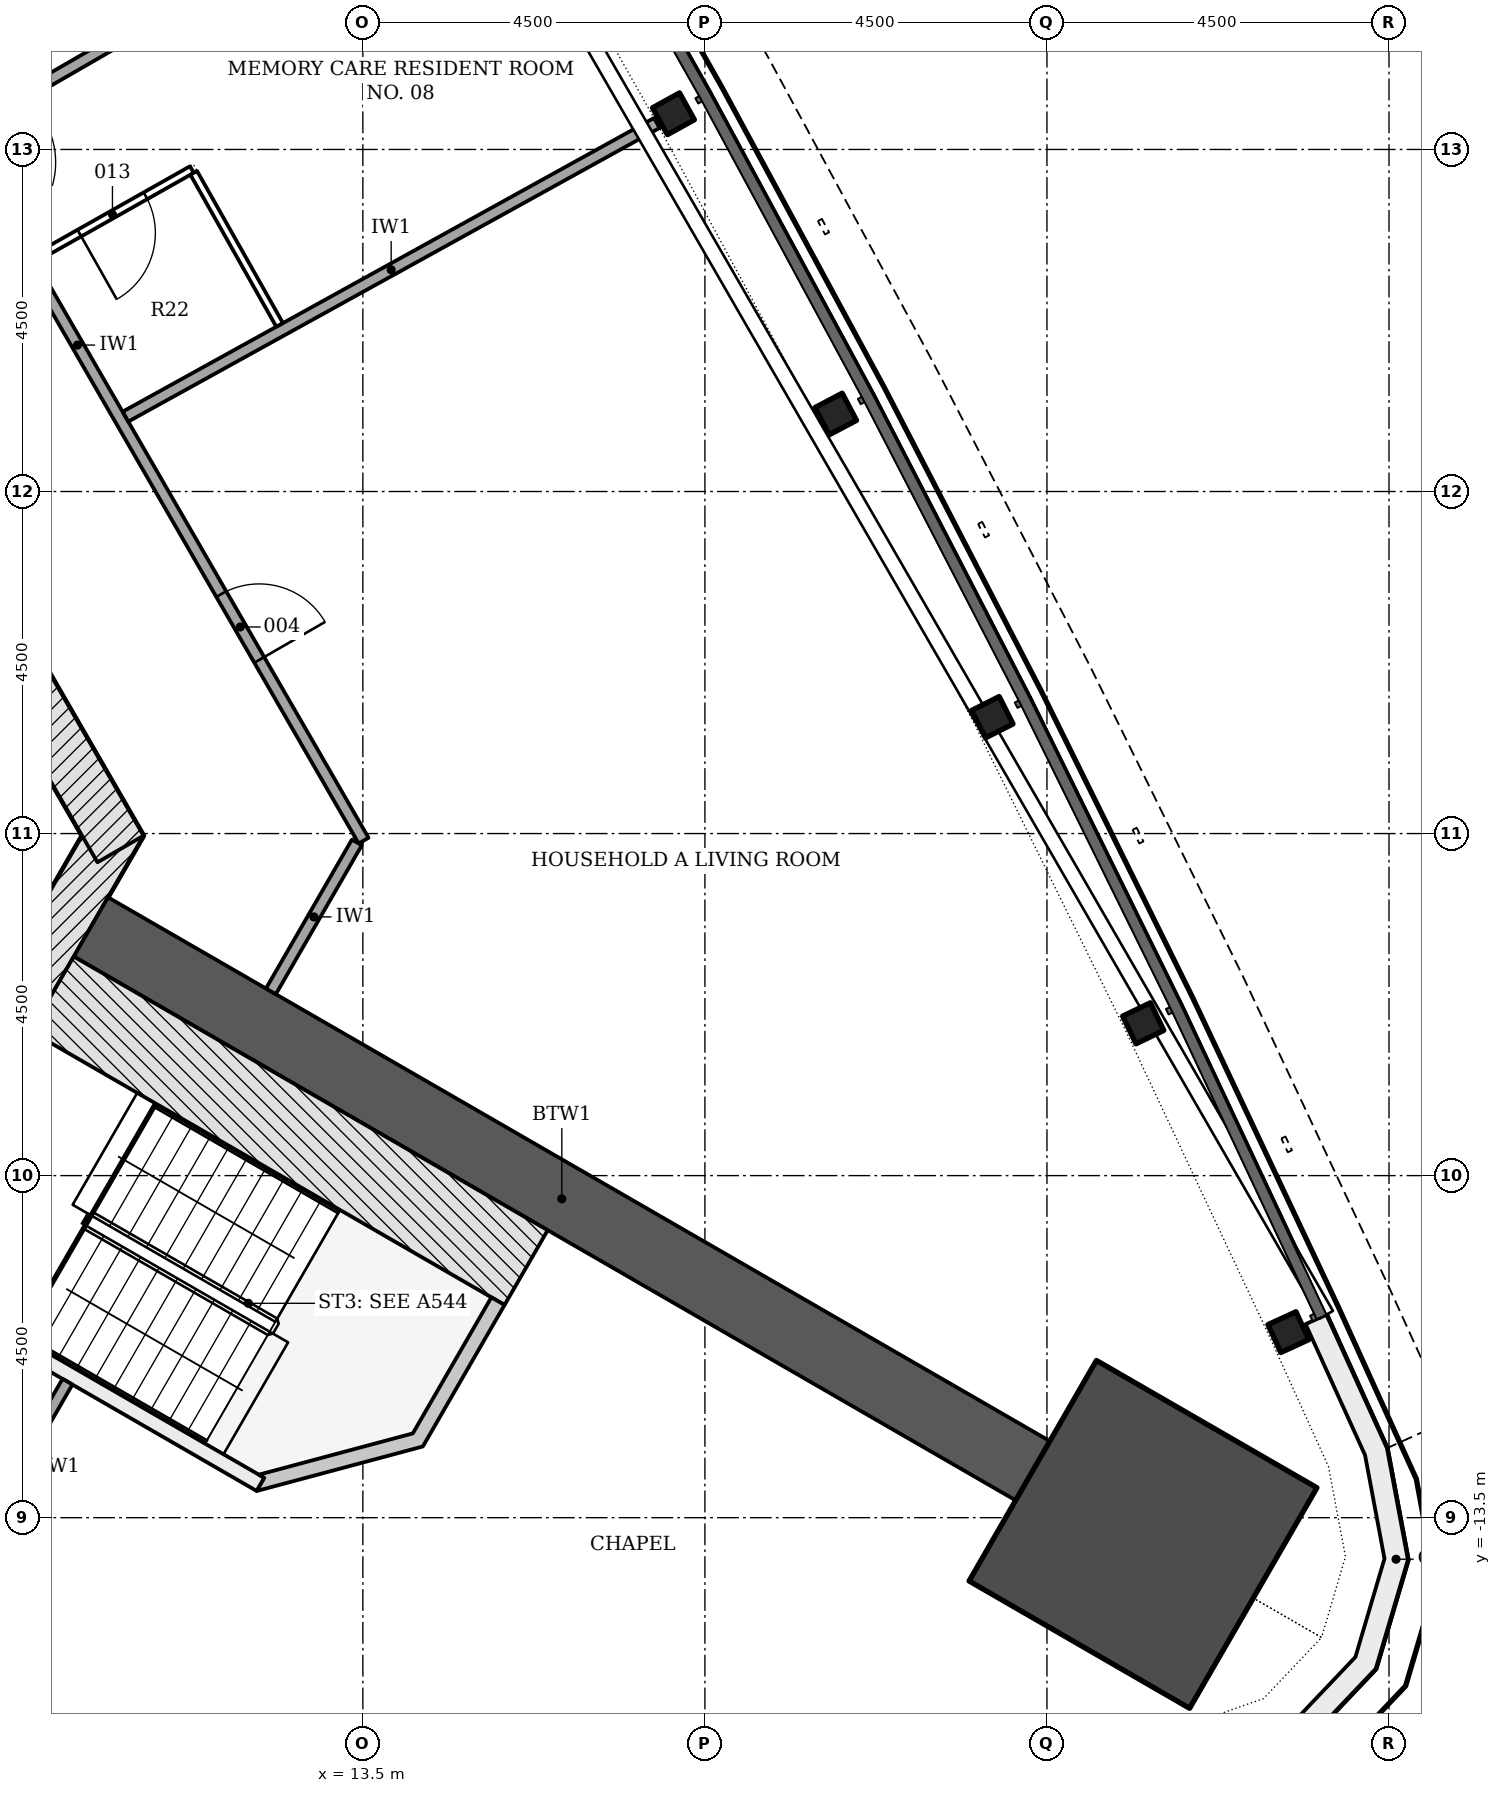
"""IFC4 building model, lengths in metres.
Left out: names, types, materials, properties, quantities, classifications, styles, units other than length and angle.
Written with IfcOpenShell. Run it as: python <this file> out.ifc"""

import sys

from ifc_helpers import new_model, si_unit, direction, frame, frame_2d, origin, origin_2d, place, context, subcontext, project, spatial, polyline, rectangle, i_section, outline, extrude, element, fill, save


model = new_model("IFC4")
c1 = context("Model", 3, precision=1e-05, world=origin(), true_north=direction((0.0, 1.0)))
c2 = subcontext(c1, "Body", "Model", "MODEL_VIEW")
j1 = project(units=[si_unit("LENGTHUNIT", "METRE"), si_unit("PLANEANGLEUNIT", "RADIAN")], contexts=[c1])
p1 = place(None, origin())
s1 = spatial("IfcSite", under=j1, at=p1, CompositionType="ELEMENT")
p2 = place(p1, origin())
s2 = spatial("IfcBuilding", under=s1, at=p2, CompositionType="ELEMENT")
p3 = place(p2, frame((0.0, 0.0, 34.8)))
s3 = spatial("IfcBuildingStorey", under=s2, at=p3, CompositionType="ELEMENT", Elevation=34.8)
p4 = place(p3, frame((8.926, -6.753, -0.2), z_axis=(0.0, 0.0, 1.0), x_axis=(0.500042739161, 0.866000726912, 0.0)))
e1 = element("IfcWall", 1, at=p4, inside=s3, PredefinedType="SHEAR", context=c2, shape_type="SweptSolid", body=[
    extrude(rectangle(XDim=2.771, YDim=0.7, at=frame_2d((1.386, 0.0))), origin(), (0.0, 0.0, 1.0), 3.6),
])
p5 = place(p3, frame((10.311, -4.703, -0.2), z_axis=(0.0, 0.0, 1.0), x_axis=(-0.500001446645, 0.866024568562, 0.0)))
e2 = element("IfcWall", 2, at=p5, inside=s3, PredefinedType="SHEAR", context=c2, shape_type="SweptSolid", body=[
    extrude(rectangle(XDim=18.458, YDim=0.7, at=frame_2d((9.229, 0.0))), origin(), (0.0, 0.0, 1.0), 3.6),
])
p6 = place(p5, frame((6.5, 0.0, 0.2)))
e3 = element("IfcOpeningElement", 3, at=p6, cuts=e2, PredefinedType="OPENING", context=c2, shape_type="SweptSolid", body=[
    extrude(rectangle(XDim=1.0, YDim=2.1, at=frame_2d((0.5, 1.05))), frame((0.0, 0.36, 0.0), z_axis=(0.0, -1.0, 0.0), x_axis=(1.0, 0.0, 0.0)), (0.0, 0.0, 1.0), 0.72),
])
p7 = place(p5, frame((2.902, 0.0, 0.2)))
e4 = element("IfcOpeningElement", 4, at=p7, cuts=e2, PredefinedType="OPENING", context=c2, shape_type="SweptSolid", body=[
    extrude(rectangle(XDim=0.9, YDim=2.1, at=frame_2d((0.45, 1.05))), frame((0.0, 0.36, 0.0), z_axis=(0.0, -1.0, 0.0), x_axis=(1.0, 0.0, 0.0)), (0.0, 0.0, 1.0), 0.72),
])
p8 = place(p5, frame((8.75, 0.0, 0.2)))
e5 = element("IfcOpeningElement", 5, at=p8, cuts=e2, PredefinedType="OPENING", context=c2, shape_type="SweptSolid", body=[
    extrude(rectangle(XDim=1.0, YDim=2.1, at=frame_2d((0.5, 1.05))), frame((0.0, 0.36, 0.0), z_axis=(0.0, -1.0, 0.0), x_axis=(1.0, 0.0, 0.0)), (0.0, 0.0, 1.0), 0.72),
])
p9 = place(p5, frame((13.977, 0.0, 0.2)))
e6 = element("IfcOpeningElement", 6, at=p9, cuts=e2, PredefinedType="OPENING", context=c2, shape_type="SweptSolid", body=[
    extrude(rectangle(XDim=0.9, YDim=2.1, at=frame_2d((0.45, 1.05))), frame((0.0, 0.36, 0.0), z_axis=(0.0, -1.0, 0.0), x_axis=(1.0, 0.0, 0.0)), (0.0, 0.0, 1.0), 0.72),
])
p10 = place(p3, frame((9.922, -5.728, -0.2), z_axis=(0.0, 0.0, 1.0), x_axis=(0.866025331845, -0.500000124603, 0.0)))
e7 = element("IfcWall", 7, at=p10, inside=s3, PredefinedType="SHEAR", context=c2, shape_type="SweptSolid", body=[
    extrude(rectangle(XDim=14.309, YDim=0.9, at=frame_2d((7.154, 0.0))), origin(), (0.0, 0.0, 1.0), 3.6),
])
p11 = place(p3, frame((23.764, -13.72, -0.2), z_axis=(0.0, 0.0, 1.0), x_axis=(0.866025403784, -0.5, 0.0)))
e8 = element("IfcColumn", 8, at=p11, inside=s3, PredefinedType="COLUMN", context=c2, shape_type="SweptSolid", body=[
    extrude(rectangle(XDim=3.35, YDim=3.35, at=origin_2d()), origin(), (0.0, 0.0, 1.0), 3.6),
])
for number, where, z_axis, x_axis in (
    (9, (25.676, -11.059, -0.2), (0.0, 0.0, 1.0), (-0.417, 0.909, 0.0)),
    (10, (23.767, -6.996, -0.2), (0.0, 0.0, 1.0), (-0.434, 0.901, 0.0)),
    (11, (21.781, -2.969, -0.2), (0.0, 0.0, 1.0), (-0.451, 0.893, 0.0)),
    (12, (19.721, 1.02, -0.2), (0.0, 0.0, 1.0), (-0.467, 0.884, 0.0)),
    (13, (17.586, 4.969, -0.2), (0.0, 0.0, 1.0), (-0.484, 0.875, 0.0)),
):
    element("IfcColumn", number, at=place(p3, frame(where, z_axis=z_axis, x_axis=x_axis)), inside=s3, PredefinedType="COLUMN", context=c2, shape_type="SweptSolid", body=[
        extrude(i_section(OverallWidth=0.404, OverallDepth=0.406, WebThickness=0.027, FlangeThickness=0.044, FilletRadius=0.015, at=origin_2d()), origin(), (0.0, 0.0, 1.0), 3.6),
    ])
p12 = place(p3, origin())
e14 = element("IfcWall", 14, at=p12, inside=s3, PredefinedType="NOTDEFINED", context=c2, shape_type="SweptSolid", body=[
    extrude(outline(polyline([(22.467, -17.254), (24.386, -17.066), (25.796, -16.571), (26.825, -15.488), (27.249, -14.055), (26.973, -12.586), (26.176, -10.83), (25.903, -10.954), (26.685, -12.677), (26.94, -14.039), (26.558, -15.333), (25.628, -16.312), (24.321, -16.771), (22.438, -16.956), (22.467, -17.254)])), origin(), (0.0, 0.0, 1.0), 3.3),
])
p13 = place(p3, frame((7.304, -10.262, -0.2), z_axis=(0.0, 0.0, 1.0), x_axis=(0.866026594901, -0.49999793692, 0.0)))
e15 = element("IfcWall", 15, at=p13, inside=s3, PredefinedType="SHEAR", context=c2, shape_type="SweptSolid", body=[
    extrude(rectangle(XDim=5.6, YDim=0.2, at=frame_2d((2.8, 0.0))), origin(), (0.0, 0.0, 1.0), 3.6),
])
p14 = place(p13, frame((0.45, 0.0, 0.2)))
e16 = element("IfcOpeningElement", 16, at=p14, cuts=e15, PredefinedType="OPENING", context=c2, shape_type="SweptSolid", body=[
    extrude(rectangle(XDim=1.2, YDim=2.1, at=frame_2d((0.6, 1.05))), frame((0.0, 0.11, 0.0), z_axis=(0.0, -1.0, 0.0), x_axis=(1.0, 0.0, 0.0)), (0.0, 0.0, 1.0), 0.22),
])
p15 = place(p3, frame((9.413, -6.61, -0.2), z_axis=(0.0, 0.0, 1.0), x_axis=(0.866018442252, -0.500012057535, 0.0)))
e17 = element("IfcWall", 17, at=p15, inside=s3, PredefinedType="SHEAR", context=c2, shape_type="SweptSolid", body=[
    extrude(rectangle(XDim=7.2, YDim=1.136, at=frame_2d((3.6, 0.0))), origin(), (0.0, 0.0, 1.0), 3.6),
])
p16 = place(p3, frame((0.0, 0.0, -0.2)))
e18 = element("IfcWall", 18, at=p16, inside=s3, PredefinedType="SHEAR", context=c2, shape_type="SweptSolid", body=[
    extrude(outline(polyline([(12.104, -13.149), (14.289, -12.563), (15.364, -10.701), (15.191, -10.601), (14.157, -12.392), (12.132, -12.934), (12.204, -12.976), (12.204, -12.976), (12.204, -12.976), (12.204, -12.976), (12.204, -12.976), (12.204, -12.976), (12.204, -12.976), (12.204, -12.976), (12.204, -12.976), (12.204, -12.976), (12.204, -12.976), (12.204, -12.976), (12.204, -12.976), (12.204, -12.976), (12.204, -12.976), (12.204, -12.976), (12.204, -12.976), (12.104, -13.149)])), origin(), (0.0, 0.0, 1.0), 3.6),
])
p17 = place(p3, frame((5.981, 8.446, 0.0), z_axis=(0.0, 0.0, 1.0), x_axis=(0.499996620721, -0.866027354803, 0.0)))
e19 = element("IfcWall", 19, at=p17, inside=s3, PredefinedType="PARTITIONING", context=c2, shape_type="SweptSolid", body=[
    extrude(rectangle(XDim=15.057, YDim=0.15, at=frame_2d((7.528, 0.0))), origin(), (0.0, 0.0, 1.0), 2.768),
])
p18 = place(p17, frame((11.311, 0.0, 0.0)))
e20 = element("IfcOpeningElement", 20, at=p18, cuts=e19, PredefinedType="OPENING", context=c2, shape_type="SweptSolid", body=[
    extrude(rectangle(XDim=1.0, YDim=2.1, at=frame_2d((0.5, 1.05))), frame((0.0, 0.085, 0.0), z_axis=(0.0, -1.0, 0.0), x_axis=(1.0, 0.0, 0.0)), (0.0, 0.0, 1.0), 0.17),
])
p19 = place(p17, frame((4.754, 0.0, 0.0)))
e21 = element("IfcOpeningElement", 21, at=p19, cuts=e19, PredefinedType="OPENING", context=c2, shape_type="SweptSolid", body=[
    extrude(rectangle(XDim=1.1, YDim=2.1, at=frame_2d((0.55, 1.05))), frame((0.0, 0.085, 0.0), z_axis=(0.0, -1.0, 0.0), x_axis=(1.0, 0.0, 0.0)), (0.0, 0.0, 1.0), 0.17),
])
p20 = place(p3, frame((8.314, -13.963, 0.0), z_axis=(0.0, 0.0, 1.0), x_axis=(0.499936506574, 0.866062058628, 0.0)))
e22 = element("IfcWall", 22, at=p20, inside=s3, PredefinedType="PARTITIONING", context=c2, shape_type="SweptSolid", body=[
    extrude(rectangle(XDim=2.6, YDim=0.15, at=frame_2d((1.3, 0.0))), origin(), (0.0, 0.0, 1.0), 2.923),
])
p21 = place(p3, frame((12.29, -6.576, 0.0), z_axis=(0.0, 0.0, 1.0), x_axis=(0.499946688677, 0.866056180903, 0.0)))
e23 = element("IfcWall", 23, at=p21, inside=s3, PredefinedType="PARTITIONING", context=c2, shape_type="SweptSolid", body=[
    extrude(rectangle(XDim=2.262, YDim=0.15, at=frame_2d((1.131, 0.0))), origin(), (0.0, 0.0, 1.0), 3.4),
])
p22 = place(p3, frame((15.161, 8.753, 0.0), z_axis=(0.0, 0.0, 1.0), x_axis=(-0.86601695431, -0.500014634633, 0.0)))
e24 = element("IfcWall", 24, at=p22, inside=s3, PredefinedType="PARTITIONING", context=c2, shape_type="SweptSolid", body=[
    extrude(rectangle(XDim=8.029, YDim=0.15, at=frame_2d((4.014, 0.0))), origin(), (0.0, 0.0, 1.0), 2.768),
])
p23 = place(p3, frame((17.367, 4.848, 0.0), z_axis=(0.0, 0.0, 1.0), x_axis=(-0.875233702412, -0.483700285469, 0.0)))
e25 = element("IfcWall", 25, at=p23, inside=s3, PredefinedType="PARTITIONING", context=c2, shape_type="SweptSolid", body=[
    extrude(rectangle(XDim=7.986, YDim=0.15, at=frame_2d((3.993, 0.0))), origin(), (0.0, 0.0, 1.0), 2.768),
])
p24 = place(p3, frame((11.25, 4.235, 0.0), z_axis=(0.0, 0.0, 1.0), x_axis=(-0.870673532045, -0.491861363188, 0.0)))
e26 = element("IfcWall", 26, at=p24, inside=s3, PredefinedType="PARTITIONING", context=c2, shape_type="SweptSolid", body=[
    extrude(rectangle(XDim=2.382, YDim=0.1, at=frame_2d((1.191, 0.0))), origin(), (0.0, 0.0, 1.0), 3.4),
])
p25 = place(p24, frame((0.7, 0.0, 0.0)))
e27 = element("IfcOpeningElement", 27, at=p25, cuts=e26, PredefinedType="OPENING", context=c2, shape_type="SweptSolid", body=[
    extrude(rectangle(XDim=1.0, YDim=2.1, at=frame_2d((0.5, 1.05))), frame((0.0, 0.06, 0.0), z_axis=(0.0, -1.0, 0.0), x_axis=(1.0, 0.0, 0.0)), (0.0, 0.0, 1.0), 0.12),
])
p26 = place(p3, frame((12.405, 2.192, 0.0), z_axis=(0.0, 0.0, 1.0), x_axis=(-0.491840077016, 0.870685556697, 0.0)))
e28 = element("IfcWall", 28, at=p26, inside=s3, PredefinedType="PARTITIONING", context=c2, shape_type="SweptSolid", body=[
    extrude(rectangle(XDim=2.297, YDim=0.1, at=frame_2d((1.148, 0.0))), origin(), (0.0, 0.0, 1.0), 2.768),
])
p27 = place(p18, origin())
e29 = element("IfcDoor", 29, at=p27, inside=s3, OperationType="SINGLE_SWING_RIGHT", PredefinedType="DOOR", context=c2, shape_type="SweptSolid", body=[
    extrude(rectangle(XDim=1.0, YDim=2.1, at=frame_2d((0.5, 1.05))), frame((0.0, 0.025, 0.0), z_axis=(0.0, -1.0, 0.0), x_axis=(1.0, 0.0, 0.0)), (0.0, 0.0, 1.0), 0.05),
])
fill(e20, e29)
p28 = place(p25, origin())
e30 = element("IfcDoor", 30, at=p28, inside=s3, OperationType="SINGLE_SWING_RIGHT", PredefinedType="DOOR", context=c2, shape_type="SweptSolid", body=[
    extrude(rectangle(XDim=1.0, YDim=2.1, at=frame_2d((0.5, 1.05))), frame((0.0, 0.025, 0.0), z_axis=(0.0, -1.0, 0.0), x_axis=(1.0, 0.0, 0.0)), (0.0, 0.0, 1.0), 0.05),
])
fill(e27, e30)
save(model, sys.argv[1])
